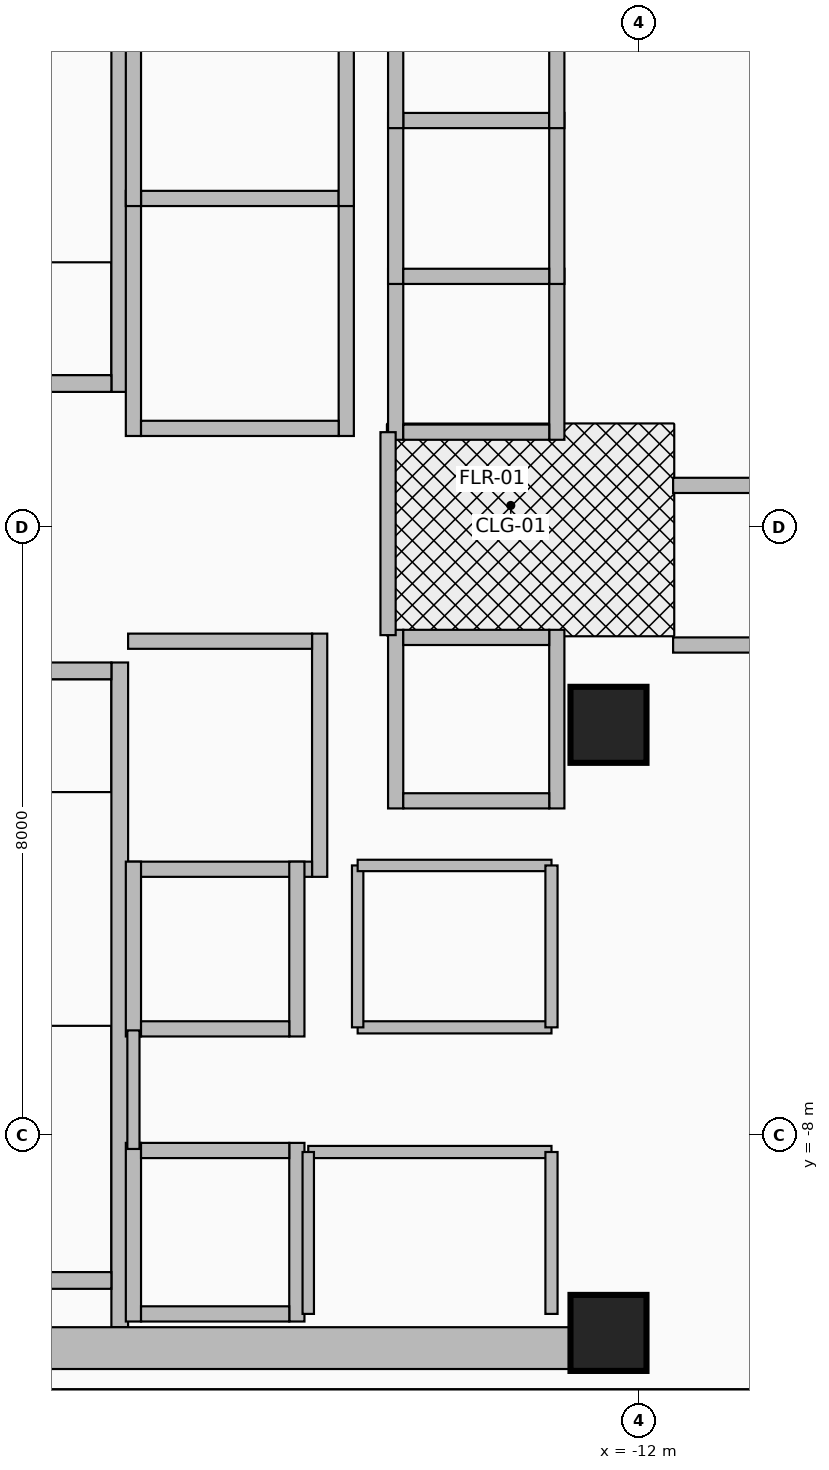
"""IFC4 building model, lengths in metres.
Left out: names, types, materials, properties, quantities, classifications, styles, units other than length and angle.
Written with IfcOpenShell. Run it as: python <this file> out.ifc"""

import sys

from ifc_helpers import new_model, si_unit, direction, frame, frame_2d, origin, origin_2d, place, context, subcontext, project, spatial, rectangle, extrude, source, transform, mapped, element, fill, save


model = new_model("IFC4")
c1 = context("Model", 3, precision=1e-05, world=origin(), true_north=direction((0.0, 1.0)))
c2 = subcontext(c1, "Body", "Model", "MODEL_VIEW")
j1 = project(units=[si_unit("LENGTHUNIT", "METRE"), si_unit("PLANEANGLEUNIT", "RADIAN")], contexts=[c1])
p1 = place(None, origin())
s1 = spatial("IfcSite", under=j1, at=p1, CompositionType="ELEMENT")
p2 = place(p1, origin())
s2 = spatial("IfcBuilding", under=s1, at=p2, CompositionType="ELEMENT")
p3 = place(p2, frame((0.0, 0.0, 172.3)))
s3 = spatial("IfcBuildingStorey", under=s2, at=p3, CompositionType="ELEMENT", Elevation=172.3)
p4 = place(p3, frame((-18.83, 1.78, 0.0), z_axis=(0.0, 0.0, 1.0), x_axis=(0.0, 1.0, 0.0)))
e1 = element("IfcWall", 1, at=p4, inside=s3, PredefinedType="SHEAR", context=c2, shape_type="SweptSolid", body=[
    extrude(rectangle(XDim=8.745, YDim=0.22, at=frame_2d((4.373, 0.0))), origin(), (0.0, 0.0, 1.0), 3.93),
])
p5 = place(p3, frame((-22.05, 1.89, 0.0), z_axis=(0.0, 0.0, 1.0), x_axis=(1.0, 0.0, 0.0)))
e2 = element("IfcWall", 2, at=p5, inside=s3, PredefinedType="SHEAR", context=c2, shape_type="SweptSolid", body=[
    extrude(rectangle(XDim=3.11, YDim=0.22, at=frame_2d((1.555, 0.0))), origin(), (0.0, 0.0, 1.0), 3.93),
])
p6 = place(p5, frame((1.0, 0.0, 0.0)))
e3 = element("IfcOpeningElement", 3, at=p6, cuts=e2, PredefinedType="OPENING", context=c2, shape_type="SweptSolid", body=[
    extrude(rectangle(XDim=1.1, YDim=2.15, at=frame_2d((0.55, 1.075))), frame((0.0, 0.125, 0.0), z_axis=(0.0, -1.0, 0.0), x_axis=(1.0, 0.0, 0.0)), (0.0, 0.0, 1.0), 0.25),
])
p7 = place(p3, frame((-18.83, -10.525, 0.0), z_axis=(0.0, 0.0, 1.0), x_axis=(0.0, 1.0, 0.0)))
e4 = element("IfcWall", 4, at=p7, inside=s3, PredefinedType="SHEAR", context=c2, shape_type="SweptSolid", body=[
    extrude(rectangle(XDim=8.745, YDim=0.22, at=frame_2d((4.373, 0.0))), origin(), (0.0, 0.0, 1.0), 3.93),
])
p8 = place(p3, frame((-22.05, -9.91, 0.0), z_axis=(0.0, 0.0, 1.0), x_axis=(1.0, 0.0, 0.0)))
e5 = element("IfcWall", 5, at=p8, inside=s3, PredefinedType="SHEAR", context=c2, shape_type="SweptSolid", body=[
    extrude(rectangle(XDim=3.11, YDim=0.22, at=frame_2d((1.555, 0.0))), origin(), (0.0, 0.0, 1.0), 3.93),
])
p9 = place(p3, frame((-22.05, -1.89, 0.0), z_axis=(0.0, 0.0, 1.0), x_axis=(1.0, 0.0, 0.0)))
e6 = element("IfcWall", 6, at=p9, inside=s3, PredefinedType="SHEAR", context=c2, shape_type="SweptSolid", body=[
    extrude(rectangle(XDim=3.11, YDim=0.22, at=frame_2d((1.555, 0.0))), origin(), (0.0, 0.0, 1.0), 3.93),
])
p10 = place(p9, frame((1.0, 0.0, 0.0)))
e7 = element("IfcOpeningElement", 7, at=p10, cuts=e6, PredefinedType="OPENING", context=c2, shape_type="SweptSolid", body=[
    extrude(rectangle(XDim=1.1, YDim=2.15, at=frame_2d((0.55, 1.075))), frame((0.0, 0.125, 0.0), z_axis=(0.0, -1.0, 0.0), x_axis=(1.0, 0.0, 0.0)), (0.0, 0.0, 1.0), 0.25),
])
p11 = place(p3, frame((-22.65, -10.8, 0.0), z_axis=(0.0, 0.0, 1.0), x_axis=(1.0, 0.0, 0.0)))
e8 = element("IfcWall", 8, at=p11, inside=s3, PredefinedType="SHEAR", context=c2, shape_type="SweptSolid", body=[
    extrude(rectangle(XDim=10.25, YDim=0.55, at=frame_2d((5.125, 0.0))), origin(), (0.0, 0.0, 1.0), 3.93),
])
m1 = source(origin(), c2, "Body", "SweptSolid", [
    extrude(rectangle(XDim=1.0, YDim=1.0, at=origin_2d()), origin(), (0.0, 0.0, 1.0), 4.25),
])
for number, where, z_axis, x_axis in (
    (9, (-12.4, -10.6, 0.0), (0.0, 0.0, 1.0), (1.0, 0.0, 0.0)),
    (10, (-12.4, -2.6, 0.0), (0.0, 0.0, 1.0), (1.0, 0.0, 0.0)),
):
    element("IfcColumn", number, at=place(p3, frame(where, z_axis=z_axis, x_axis=x_axis)), inside=s3, PredefinedType="COLUMN", context=c2, shape_type="MappedRepresentation", body=[
        mapped(m1, transform((0.0, 0.0, 0.0), x_axis=(1.0, 0.0, 0.0), y_axis=(0.0, 1.0, 0.0), z_axis=(0.0, 0.0, 1.0), scale=1.0)),
    ])
for number, where, z_axis, x_axis in (
    (11, (-18.65, 1.2, 0.0), (0.0, 0.0, 1.0), (0.0, 1.0, 0.0)),
    (12, (-15.85, 1.2, 0.0), (0.0, 0.0, 1.0), (0.0, 1.0, 0.0)),
):
    element("IfcWall", number, at=place(p3, frame(where, z_axis=z_axis, x_axis=x_axis)), inside=s3, PredefinedType="MOVABLE", context=c2, shape_type="SweptSolid", body=[
        extrude(rectangle(XDim=3.225, YDim=0.2, at=frame_2d((1.613, 0.0))), origin(), (0.0, 0.0, 1.0), 3.93),
    ])
p12 = place(p3, frame((-18.55, 1.3, 0.0), z_axis=(0.0, 0.0, 1.0), x_axis=(1.0, 0.0, 0.0)))
e13 = element("IfcWall", 13, at=p12, inside=s3, PredefinedType="MOVABLE", context=c2, shape_type="SweptSolid", body=[
    extrude(rectangle(XDim=2.6, YDim=0.2, at=frame_2d((1.3, 0.0))), origin(), (0.0, 0.0, 1.0), 3.93),
])
p13 = place(p12, frame((0.7, 0.0, 0.0)))
e14 = element("IfcOpeningElement", 14, at=p13, cuts=e13, PredefinedType="OPENING", context=c2, shape_type="SweptSolid", body=[
    extrude(rectangle(XDim=1.2, YDim=2.1, at=frame_2d((0.6, 1.05))), frame((0.0, 0.115, 0.0), z_axis=(0.0, -1.0, 0.0), x_axis=(1.0, 0.0, 0.0)), (0.0, 0.0, 1.0), 0.23),
])
p14 = place(p3, frame((-18.55, 4.325, 0.0), z_axis=(0.0, 0.0, 1.0), x_axis=(1.0, 0.0, 0.0)))
e15 = element("IfcWall", 15, at=p14, inside=s3, PredefinedType="MOVABLE", context=c2, shape_type="SweptSolid", body=[
    extrude(rectangle(XDim=2.6, YDim=0.2, at=frame_2d((1.3, 0.0))), origin(), (0.0, 0.0, 1.0), 3.93),
])
p15 = place(p3, frame((-16.2, -4.6, 0.0), z_axis=(0.0, 0.0, 1.0), x_axis=(0.0, 1.0, 0.0)))
e16 = element("IfcWall", 16, at=p15, inside=s3, PredefinedType="MOVABLE", context=c2, shape_type="SweptSolid", body=[
    extrude(rectangle(XDim=3.2, YDim=0.2, at=frame_2d((1.6, 0.0))), origin(), (0.0, 0.0, 1.0), 3.93),
])
p16 = place(p3, frame((-18.72, -4.5, 0.0), z_axis=(0.0, 0.0, 1.0), x_axis=(1.0, 0.0, 0.0)))
e17 = element("IfcWall", 17, at=p16, inside=s3, PredefinedType="MOVABLE", context=c2, shape_type="SweptSolid", body=[
    extrude(rectangle(XDim=2.42, YDim=0.2, at=frame_2d((1.21, 0.0))), origin(), (0.0, 0.0, 1.0), 3.93),
])
p17 = place(p3, frame((-18.72, -1.5, 0.0), z_axis=(0.0, 0.0, 1.0), x_axis=(1.0, 0.0, 0.0)))
e18 = element("IfcWall", 18, at=p17, inside=s3, PredefinedType="MOVABLE", context=c2, shape_type="SweptSolid", body=[
    extrude(rectangle(XDim=2.42, YDim=0.2, at=frame_2d((1.21, 0.0))), origin(), (0.0, 0.0, 1.0), 3.93),
])
p18 = place(p17, frame((0.61, 0.0, 0.0)))
e19 = element("IfcOpeningElement", 19, at=p18, cuts=e18, PredefinedType="OPENING", context=c2, shape_type="SweptSolid", body=[
    extrude(rectangle(XDim=1.2, YDim=2.1, at=frame_2d((0.6, 1.05))), frame((0.0, 0.115, 0.0), z_axis=(0.0, -1.0, 0.0), x_axis=(1.0, 0.0, 0.0)), (0.0, 0.0, 1.0), 0.23),
])
for number, where, z_axis, x_axis in (
    (20, (-18.65, 4.225, 0.0), (0.0, 0.0, 1.0), (0.0, 1.0, 0.0)),
    (21, (-15.85, 4.225, 0.0), (0.0, 0.0, 1.0), (0.0, 1.0, 0.0)),
):
    element("IfcWall", number, at=place(p3, frame(where, z_axis=z_axis, x_axis=x_axis)), inside=s3, PredefinedType="MOVABLE", context=c2, shape_type="SweptSolid", body=[
        extrude(rectangle(XDim=3.325, YDim=0.2, at=frame_2d((1.663, 0.0))), origin(), (0.0, 0.0, 1.0), 3.93),
    ])
for number, where, z_axis, x_axis in (
    (22, (-18.65, -10.45, 0.0), (0.0, 0.0, 1.0), (0.0, 1.0, 0.0)),
    (23, (-16.5, -10.45, 0.0), (0.0, 0.0, 1.0), (0.0, 1.0, 0.0)),
):
    element("IfcWall", number, at=place(p3, frame(where, z_axis=z_axis, x_axis=x_axis)), inside=s3, PredefinedType="MOVABLE", context=c2, shape_type="SweptSolid", body=[
        extrude(rectangle(XDim=2.35, YDim=0.2, at=frame_2d((1.175, 0.0))), origin(), (0.0, 0.0, 1.0), 2.965),
    ])
p19 = place(p3, frame((-18.55, -10.35, 0.0), z_axis=(0.0, 0.0, 1.0), x_axis=(1.0, 0.0, 0.0)))
e24 = element("IfcWall", 24, at=p19, inside=s3, PredefinedType="MOVABLE", context=c2, shape_type="SweptSolid", body=[
    extrude(rectangle(XDim=1.95, YDim=0.2, at=frame_2d((0.975, 0.0))), origin(), (0.0, 0.0, 1.0), 2.965),
])
p20 = place(p3, frame((-18.55, -8.2, 0.0), z_axis=(0.0, 0.0, 1.0), x_axis=(1.0, 0.0, 0.0)))
e25 = element("IfcWall", 25, at=p20, inside=s3, PredefinedType="MOVABLE", context=c2, shape_type="SweptSolid", body=[
    extrude(rectangle(XDim=1.95, YDim=0.2, at=frame_2d((0.975, 0.0))), origin(), (0.0, 0.0, 1.0), 3.93),
])
p21 = place(p20, frame((0.425, 0.0, 0.0)))
e26 = element("IfcOpeningElement", 26, at=p21, cuts=e25, PredefinedType="OPENING", context=c2, shape_type="SweptSolid", body=[
    extrude(rectangle(XDim=1.1, YDim=2.1, at=frame_2d((0.55, 1.05))), frame((0.0, 0.115, 0.0), z_axis=(0.0, -1.0, 0.0), x_axis=(1.0, 0.0, 0.0)), (0.0, 0.0, 1.0), 0.23),
])
p22 = place(p3, frame((-15.2, 1.15, 0.0), z_axis=(0.0, 0.0, 1.0), x_axis=(0.0, 1.0, 0.0)))
e27 = element("IfcWall", 27, at=p22, inside=s3, PredefinedType="MOVABLE", context=c2, shape_type="SweptSolid", body=[
    extrude(rectangle(XDim=2.25, YDim=0.2, at=frame_2d((1.125, 0.0))), origin(), (0.0, 0.0, 1.0), 3.93),
])
p23 = place(p3, frame((-13.08, 1.15, 0.0), z_axis=(0.0, 0.0, 1.0), x_axis=(0.0, 1.0, 0.0)))
e28 = element("IfcWall", 28, at=p23, inside=s3, PredefinedType="MOVABLE", context=c2, shape_type="SweptSolid", body=[
    extrude(rectangle(XDim=2.25, YDim=0.2, at=frame_2d((1.125, 0.0))), origin(), (0.0, 0.0, 1.0), 3.93),
])
p24 = place(p23, frame((0.575, 0.0, 0.0)))
e29 = element("IfcOpeningElement", 29, at=p24, cuts=e28, PredefinedType="OPENING", context=c2, shape_type="SweptSolid", body=[
    extrude(rectangle(XDim=1.1, YDim=2.1, at=frame_2d((0.55, 1.05))), frame((0.0, 0.115, 0.0), z_axis=(0.0, -1.0, 0.0), x_axis=(1.0, 0.0, 0.0)), (0.0, 0.0, 1.0), 0.23),
])
p25 = place(p3, frame((-15.1, 1.25, 0.0), z_axis=(0.0, 0.0, 1.0), x_axis=(1.0, 0.0, 0.0)))
e30 = element("IfcWall", 30, at=p25, inside=s3, PredefinedType="MOVABLE", context=c2, shape_type="SweptSolid", body=[
    extrude(rectangle(XDim=1.92, YDim=0.2, at=frame_2d((0.96, 0.0))), origin(), (0.0, 0.0, 1.0), 3.93),
])
for number, where, z_axis, x_axis in (
    (31, (-15.2, 3.2, 0.0), (0.0, 0.0, 1.0), (0.0, 1.0, 0.0)),
    (32, (-13.08, 3.2, 0.0), (0.0, 0.0, 1.0), (0.0, 1.0, 0.0)),
):
    element("IfcWall", number, at=place(p3, frame(where, z_axis=z_axis, x_axis=x_axis)), inside=s3, PredefinedType="MOVABLE", context=c2, shape_type="SweptSolid", body=[
        extrude(rectangle(XDim=2.25, YDim=0.2, at=frame_2d((1.125, 0.0))), origin(), (0.0, 0.0, 1.0), 3.93),
    ])
for number, where, z_axis, x_axis in (
    (33, (-15.1, 3.3, 0.0), (0.0, 0.0, 1.0), (1.0, 0.0, 0.0)),
    (34, (-15.1, 5.35, 0.0), (0.0, 0.0, 1.0), (1.0, 0.0, 0.0)),
):
    element("IfcWall", number, at=place(p3, frame(where, z_axis=z_axis, x_axis=x_axis)), inside=s3, PredefinedType="MOVABLE", context=c2, shape_type="SweptSolid", body=[
        extrude(rectangle(XDim=1.92, YDim=0.2, at=frame_2d((0.96, 0.0))), origin(), (0.0, 0.0, 1.0), 3.93),
    ])
for number, where, z_axis, x_axis in (
    (35, (-15.2, 5.25, 0.0), (0.0, 0.0, 1.0), (0.0, 1.0, 0.0)),
    (36, (-13.08, 5.25, 0.0), (0.0, 0.0, 1.0), (0.0, 1.0, 0.0)),
):
    element("IfcWall", number, at=place(p3, frame(where, z_axis=z_axis, x_axis=x_axis)), inside=s3, PredefinedType="MOVABLE", context=c2, shape_type="SweptSolid", body=[
        extrude(rectangle(XDim=2.25, YDim=0.2, at=frame_2d((1.125, 0.0))), origin(), (0.0, 0.0, 1.0), 3.93),
    ])
for number, where, z_axis, x_axis in (
    (37, (-18.65, -6.7, 0.0), (0.0, 0.0, 1.0), (0.0, 1.0, 0.0)),
    (38, (-16.5, -6.7, 0.0), (0.0, 0.0, 1.0), (0.0, 1.0, 0.0)),
):
    element("IfcWall", number, at=place(p3, frame(where, z_axis=z_axis, x_axis=x_axis)), inside=s3, PredefinedType="MOVABLE", context=c2, shape_type="SweptSolid", body=[
        extrude(rectangle(XDim=2.3, YDim=0.2, at=frame_2d((1.15, 0.0))), origin(), (0.0, 0.0, 1.0), 3.93),
    ])
p26 = place(p3, frame((-18.55, -6.6, 0.0), z_axis=(0.0, 0.0, 1.0), x_axis=(1.0, 0.0, 0.0)))
e39 = element("IfcWall", 39, at=p26, inside=s3, PredefinedType="MOVABLE", context=c2, shape_type="SweptSolid", body=[
    extrude(rectangle(XDim=1.95, YDim=0.2, at=frame_2d((0.975, 0.0))), origin(), (0.0, 0.0, 1.0), 3.93),
])
for number, where, z_axis, x_axis in (
    (40, (-15.2, -3.7, 0.0), (0.0, 0.0, 1.0), (0.0, 1.0, 0.0)),
    (41, (-13.08, -3.7, 0.0), (0.0, 0.0, 1.0), (0.0, 1.0, 0.0)),
):
    element("IfcWall", number, at=place(p3, frame(where, z_axis=z_axis, x_axis=x_axis)), inside=s3, PredefinedType="MOVABLE", context=c2, shape_type="SweptSolid", body=[
        extrude(rectangle(XDim=2.35, YDim=0.2, at=frame_2d((1.175, 0.0))), origin(), (0.0, 0.0, 1.0), 3.93),
    ])
for number, where, z_axis, x_axis in (
    (42, (-15.1, -3.6, 0.0), (0.0, 0.0, 1.0), (1.0, 0.0, 0.0)),
    (43, (-15.1, -1.45, 0.0), (0.0, 0.0, 1.0), (1.0, 0.0, 0.0)),
):
    element("IfcWall", number, at=place(p3, frame(where, z_axis=z_axis, x_axis=x_axis)), inside=s3, PredefinedType="MOVABLE", context=c2, shape_type="SweptSolid", body=[
        extrude(rectangle(XDim=1.92, YDim=0.2, at=frame_2d((0.96, 0.0))), origin(), (0.0, 0.0, 1.0), 3.93),
    ])
p27 = place(p3, frame((-15.3, -1.42, 0.0), z_axis=(0.0, 0.0, 1.0), x_axis=(0.0, 1.0, 0.0)))
e44 = element("IfcWall", 44, at=p27, inside=s3, PredefinedType="PARTITIONING", context=c2, shape_type="SweptSolid", body=[
    extrude(rectangle(XDim=2.67, YDim=0.2, at=frame_2d((1.335, 0.0))), origin(), (0.0, 0.0, 1.0), 3.93),
])
p28 = place(p27, frame((0.78, 0.0, 0.0)))
e45 = element("IfcOpeningElement", 45, at=p28, cuts=e44, PredefinedType="OPENING", context=c2, shape_type="SweptSolid", body=[
    extrude(rectangle(XDim=1.05, YDim=2.15, at=frame_2d((0.525, 1.075))), frame((0.0, 0.115, 0.0), z_axis=(0.0, -1.0, 0.0), x_axis=(1.0, 0.0, 0.0)), (0.0, 0.0, 1.0), 0.23),
])
p29 = place(p3, frame((-18.65, -8.18, 0.0), z_axis=(0.0, 0.0, 1.0), x_axis=(0.0, 1.0, 0.0)))
e46 = element("IfcWall", 46, at=p29, inside=s3, PredefinedType="PARTITIONING", context=c2, shape_type="SweptSolid", body=[
    extrude(rectangle(XDim=1.56, YDim=0.16, at=frame_2d((0.78, 0.0))), origin(), (0.0, 0.0, 1.0), 3.93),
])
p30 = place(p3, frame((-16.35, -8.22, 0.0), z_axis=(0.0, 0.0, 1.0), x_axis=(1.0, 0.0, 0.0)))
e47 = element("IfcWall", 47, at=p30, inside=s3, PredefinedType="PARTITIONING", context=c2, shape_type="SweptSolid", body=[
    extrude(rectangle(XDim=3.2, YDim=0.16, at=frame_2d((1.6, 0.0))), origin(), (0.0, 0.0, 1.0), 3.93),
])
p31 = place(p30, frame((1.15, 0.0, 0.0)))
e48 = element("IfcOpeningElement", 48, at=p31, cuts=e47, PredefinedType="OPENING", context=c2, shape_type="SweptSolid", body=[
    extrude(rectangle(XDim=0.95, YDim=2.15, at=frame_2d((0.475, 1.075))), frame((0.0, 0.095, 0.0), z_axis=(0.0, -1.0, 0.0), x_axis=(1.0, 0.0, 0.0)), (0.0, 0.0, 1.0), 0.19),
])
p32 = place(p3, frame((-16.35, -10.35, 0.0), z_axis=(0.0, 0.0, 1.0), x_axis=(0.0, 1.0, 0.0)))
e49 = element("IfcWall", 49, at=p32, inside=s3, PredefinedType="PARTITIONING", context=c2, shape_type="SweptSolid", body=[
    extrude(rectangle(XDim=2.13, YDim=0.15, at=frame_2d((1.065, 0.0))), origin(), (0.0, 0.0, 1.0), 3.93),
])
p33 = place(p3, frame((-13.15, -10.35, 0.0), z_axis=(0.0, 0.0, 1.0), x_axis=(0.0, 1.0, 0.0)))
e50 = element("IfcWall", 50, at=p33, inside=s3, PredefinedType="PARTITIONING", context=c2, shape_type="SweptSolid", body=[
    extrude(rectangle(XDim=2.13, YDim=0.16, at=frame_2d((1.065, 0.0))), origin(), (0.0, 0.0, 1.0), 3.93),
])
p34 = place(p3, frame((-15.7, -6.58, 0.0), z_axis=(0.0, 0.0, 1.0), x_axis=(1.0, 0.0, 0.0)))
e51 = element("IfcWall", 51, at=p34, inside=s3, PredefinedType="PARTITIONING", context=c2, shape_type="SweptSolid", body=[
    extrude(rectangle(XDim=2.55, YDim=0.16, at=frame_2d((1.275, 0.0))), origin(), (0.0, 0.0, 1.0), 3.93),
])
p35 = place(p34, frame((0.5, 0.0, 0.0)))
e52 = element("IfcOpeningElement", 52, at=p35, cuts=e51, PredefinedType="OPENING", context=c2, shape_type="SweptSolid", body=[
    extrude(rectangle(XDim=0.85, YDim=2.05, at=frame_2d((0.425, 1.025))), frame((0.0, 0.095, 0.0), z_axis=(0.0, -1.0, 0.0), x_axis=(1.0, 0.0, 0.0)), (0.0, 0.0, 1.0), 0.19),
])
p36 = place(p3, frame((-15.7, -6.58, 0.0), z_axis=(0.0, 0.0, 1.0), x_axis=(0.0, 1.0, 0.0)))
e53 = element("IfcWall", 53, at=p36, inside=s3, PredefinedType="PARTITIONING", context=c2, shape_type="SweptSolid", body=[
    extrude(rectangle(XDim=2.13, YDim=0.15, at=frame_2d((1.065, 0.0))), origin(), (0.0, 0.0, 1.0), 3.93),
])
p37 = place(p3, frame((-15.7, -4.45, 0.0), z_axis=(0.0, 0.0, 1.0), x_axis=(1.0, 0.0, 0.0)))
e54 = element("IfcWall", 54, at=p37, inside=s3, PredefinedType="PARTITIONING", context=c2, shape_type="SweptSolid", body=[
    extrude(rectangle(XDim=2.55, YDim=0.15, at=frame_2d((1.275, 0.0))), origin(), (0.0, 0.0, 1.0), 3.93),
])
p38 = place(p3, frame((-13.15, -6.58, 0.0), z_axis=(0.0, 0.0, 1.0), x_axis=(0.0, 1.0, 0.0)))
e55 = element("IfcWall", 55, at=p38, inside=s3, PredefinedType="PARTITIONING", context=c2, shape_type="SweptSolid", body=[
    extrude(rectangle(XDim=2.13, YDim=0.16, at=frame_2d((1.065, 0.0))), origin(), (0.0, 0.0, 1.0), 3.93),
])
p39 = place(p3, frame((-23.45, -11.42, 0.0), z_axis=(0.0, 0.0, 1.0), x_axis=(1.0, 0.0, 0.0)))
e56 = element("IfcWall", 56, at=p39, inside=s3, PredefinedType="PARTITIONING", context=c2, shape_type="SweptSolid", body=[
    extrude(rectangle(XDim=13.84, YDim=0.16, at=frame_2d((6.92, 0.0))), origin(), (0.0, 0.0, 1.0), 3.304),
])
p40 = place(p3, frame((-11.55, 0.55, 0.0), z_axis=(0.0, 0.0, 1.0), x_axis=(1.0, 0.0, 0.0)))
e57 = element("IfcWall", 57, at=p40, inside=s3, PredefinedType="PARTITIONING", context=c2, shape_type="SweptSolid", body=[
    extrude(rectangle(XDim=24.97, YDim=0.2, at=frame_2d((12.485, 0.0))), origin(), (0.0, 0.0, 1.0), 2.715),
])
p41 = place(p3, frame((-11.55, -1.55, 0.0), z_axis=(0.0, 0.0, 1.0), x_axis=(1.0, 0.0, 0.0)))
e58 = element("IfcWall", 58, at=p41, inside=s3, PredefinedType="PARTITIONING", context=c2, shape_type="SweptSolid", body=[
    extrude(rectangle(XDim=1.5, YDim=0.2, at=frame_2d((0.75, 0.0))), origin(), (0.0, 0.0, 1.0), 2.715),
])
p42 = place(p13, origin())
e59 = element("IfcDoor", 59, at=p42, inside=s3, OperationType="DOUBLE_DOOR_SLIDING", PredefinedType="DOOR", context=c2, shape_type="SweptSolid", body=[
    extrude(rectangle(XDim=1.2, YDim=2.1, at=frame_2d((0.6, 1.05))), frame((0.0, 0.025, 0.0), z_axis=(0.0, -1.0, 0.0), x_axis=(1.0, 0.0, 0.0)), (0.0, 0.0, 1.0), 0.05),
])
fill(e14, e59)
p43 = place(p18, origin())
e60 = element("IfcDoor", 60, at=p43, inside=s3, OperationType="DOUBLE_DOOR_SLIDING", PredefinedType="DOOR", context=c2, shape_type="SweptSolid", body=[
    extrude(rectangle(XDim=1.2, YDim=2.1, at=frame_2d((0.6, 1.05))), frame((0.0, 0.025, 0.0), z_axis=(0.0, -1.0, 0.0), x_axis=(1.0, 0.0, 0.0)), (0.0, 0.0, 1.0), 0.05),
])
fill(e19, e60)
p44 = place(p21, origin())
e61 = element("IfcDoor", 61, at=p44, inside=s3, OperationType="DOUBLE_DOOR_SLIDING", PredefinedType="DOOR", context=c2, shape_type="SweptSolid", body=[
    extrude(rectangle(XDim=1.1, YDim=2.1, at=frame_2d((0.55, 1.05))), frame((0.0, 0.025, 0.0), z_axis=(0.0, -1.0, 0.0), x_axis=(1.0, 0.0, 0.0)), (0.0, 0.0, 1.0), 0.05),
])
fill(e26, e61)
p45 = place(p24, origin())
e62 = element("IfcDoor", 62, at=p45, inside=s3, OperationType="DOUBLE_DOOR_SLIDING", PredefinedType="DOOR", context=c2, shape_type="SweptSolid", body=[
    extrude(rectangle(XDim=1.1, YDim=2.1, at=frame_2d((0.55, 1.05))), frame((0.0, 0.025, 0.0), z_axis=(0.0, -1.0, 0.0), x_axis=(1.0, 0.0, 0.0)), (0.0, 0.0, 1.0), 0.05),
])
fill(e29, e62)
p46 = place(p28, origin())
e63 = element("IfcDoor", 63, at=p46, inside=s3, OperationType="SINGLE_SWING_RIGHT", PredefinedType="DOOR", context=c2, shape_type="SweptSolid", body=[
    extrude(rectangle(XDim=1.05, YDim=2.15, at=frame_2d((0.525, 1.075))), frame((0.0, 0.025, 0.0), z_axis=(0.0, -1.0, 0.0), x_axis=(1.0, 0.0, 0.0)), (0.0, 0.0, 1.0), 0.05),
])
fill(e45, e63)
p47 = place(p31, origin())
e64 = element("IfcDoor", 64, at=p47, inside=s3, OperationType="SINGLE_SWING_LEFT", PredefinedType="DOOR", context=c2, shape_type="SweptSolid", body=[
    extrude(rectangle(XDim=0.95, YDim=2.15, at=frame_2d((0.475, 1.075))), frame((0.0, 0.025, 0.0), z_axis=(0.0, -1.0, 0.0), x_axis=(1.0, 0.0, 0.0)), (0.0, 0.0, 1.0), 0.05),
])
fill(e48, e64)
p48 = place(p35, origin())
e65 = element("IfcDoor", 65, at=p48, inside=s3, OperationType="SINGLE_SWING_RIGHT", PredefinedType="DOOR", context=c2, shape_type="SweptSolid", body=[
    extrude(rectangle(XDim=0.85, YDim=2.05, at=frame_2d((0.425, 1.025))), frame((0.0, 0.025, 0.0), z_axis=(0.0, -1.0, 0.0), x_axis=(1.0, 0.0, 0.0)), (0.0, 0.0, 1.0), 0.05),
])
fill(e52, e65)
save(model, sys.argv[1])
